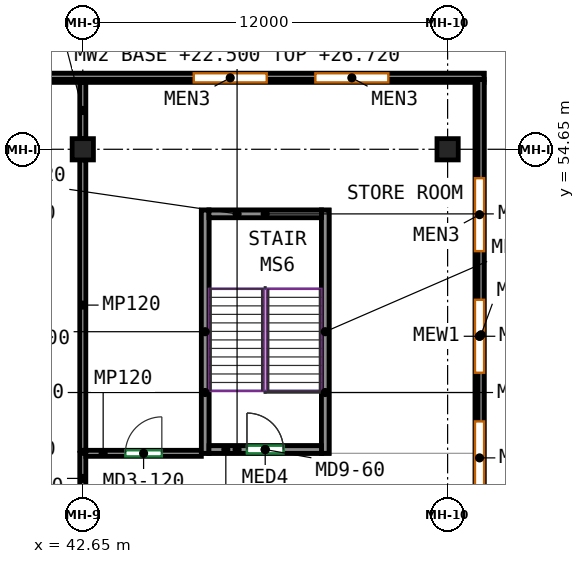
"""IFC4 building model, lengths in metres.
Left out: names, types, materials, properties, quantities, classifications, styles, units other than length and angle.
Written with IfcOpenShell. Run it as: python <this file> out.ifc"""

import sys

from ifc_helpers import new_model, si_unit, direction, frame, frame_2d, origin, origin_2d, place, context, subcontext, project, spatial, rectangle, extrude, source, transform, mapped, element, fill, save


model = new_model("IFC4")
c1 = context("Model", 3, precision=1e-05, world=origin(), true_north=direction((0.0, 1.0)))
c2 = subcontext(c1, "Body", "Model", "MODEL_VIEW")
j1 = project(units=[si_unit("LENGTHUNIT", "METRE"), si_unit("PLANEANGLEUNIT", "RADIAN")], contexts=[c1])
p1 = place(None, origin())
s1 = spatial("IfcSite", under=j1, at=p1, CompositionType="ELEMENT")
p2 = place(p1, origin())
s2 = spatial("IfcBuilding", under=s1, at=p2, CompositionType="ELEMENT")
p3 = place(p2, frame((0.0, 0.0, 22.5)))
s3 = spatial("IfcBuildingStorey", under=s2, at=p3, CompositionType="ELEMENT", Elevation=22.5)
m1 = source(origin(), c2, "Body", "SweptSolid", [
    extrude(rectangle(XDim=0.7, YDim=0.7, at=origin_2d()), origin(), (0.0, 0.0, 1.0), 4.22),
])
for number, where, z_axis, x_axis in (
    (1, (42.65, 54.65, 0.0), (0.0, 0.0, 1.0), (1.0, 0.0, 0.0)),
    (2, (54.65, 54.65, 0.0), (0.0, 0.0, 1.0), (1.0, 0.0, 0.0)),
):
    element("IfcColumn", number, at=place(p3, frame(where, z_axis=z_axis, x_axis=x_axis)), inside=s3, PredefinedType="COLUMN", context=c2, shape_type="MappedRepresentation", body=[
        mapped(m1, transform((0.0, 0.0, 0.0))),
    ])
m2 = source(origin(), c2, "Body", "SweptSolid", [
    extrude(rectangle(XDim=8.0, YDim=0.25, at=frame_2d((4.0, 0.0))), origin(), (0.0, 0.0, 1.0), 4.22),
])
for number, where, z_axis, x_axis in (
    (3, (46.675, 44.65, 0.0), (0.0, 0.0, 1.0), (0.0, 1.0, 0.0)),
    (4, (50.625, 44.65, 0.0), (0.0, 0.0, 1.0), (0.0, 1.0, 0.0)),
):
    element("IfcWall", number, at=place(p3, frame(where, z_axis=z_axis, x_axis=x_axis)), inside=s3, PredefinedType="SHEAR", context=c2, shape_type="MappedRepresentation", body=[
        mapped(m2, transform((0.0, 0.0, 0.0))),
    ])
m3 = source(origin(), c2, "Body", "SweptSolid", [
    extrude(rectangle(XDim=3.7, YDim=0.25, at=frame_2d((1.85, 0.0))), origin(), (0.0, 0.0, 1.0), 4.22),
])
p4 = place(p3, frame((46.8, 44.775, 0.0), z_axis=(0.0, 0.0, 1.0), x_axis=(1.0, 0.0, 0.0)))
e5 = element("IfcWall", 5, at=p4, inside=s3, PredefinedType="SHEAR", context=c2, shape_type="MappedRepresentation", body=[
    mapped(m3, transform((0.0, 0.0, 0.0))),
])
p5 = place(p4, frame((1.25, 0.0, 0.0)))
e6 = element("IfcOpeningElement", 6, at=p5, cuts=e5, PredefinedType="OPENING", context=c2, shape_type="SweptSolid", body=[
    extrude(rectangle(XDim=1.2, YDim=2.1, at=frame_2d((0.6, 1.05))), frame((0.0, 0.135, 0.0), z_axis=(0.0, -1.0, 0.0), x_axis=(1.0, 0.0, 0.0)), (0.0, 0.0, 1.0), 0.27),
])
p6 = place(p3, frame((46.8, 52.525, 0.0), z_axis=(0.0, 0.0, 1.0), x_axis=(1.0, 0.0, 0.0)))
e7 = element("IfcWall", 7, at=p6, inside=s3, PredefinedType="SHEAR", context=c2, shape_type="MappedRepresentation", body=[
    mapped(m3, transform((0.0, 0.0, 0.0))),
])
m4 = source(origin(), c2, "Body", "SweptSolid", [
    extrude(rectangle(XDim=112.7, YDim=0.3, at=frame_2d((56.35, 0.0))), origin(), (0.0, 0.0, 1.0), 4.22),
])
p7 = place(p3, frame((-56.85, 57.0, 0.0), z_axis=(0.0, 0.0, 1.0), x_axis=(1.0, 0.0, 0.0)))
e8 = element("IfcWall", 8, at=p7, inside=s3, PredefinedType="SOLIDWALL", context=c2, shape_type="MappedRepresentation", body=[
    mapped(m4, transform((0.0, 0.0, 0.0))),
])
p8 = place(p7, frame((3.15, 0.0, 0.9)))
e9 = element("IfcOpeningElement", 9, at=p8, cuts=e8, PredefinedType="OPENING", context=c2, shape_type="SweptSolid", body=[
    extrude(rectangle(XDim=2.4, YDim=1.8, at=frame_2d((1.2, 0.9))), frame((0.0, 0.16, 0.0), z_axis=(0.0, -1.0, 0.0), x_axis=(1.0, 0.0, 0.0)), (0.0, 0.0, 1.0), 0.32),
])
p9 = place(p7, frame((7.15, 0.0, 0.9)))
e10 = element("IfcOpeningElement", 10, at=p9, cuts=e8, PredefinedType="OPENING", context=c2, shape_type="SweptSolid", body=[
    extrude(rectangle(XDim=2.4, YDim=1.8, at=frame_2d((1.2, 0.9))), frame((0.0, 0.16, 0.0), z_axis=(0.0, -1.0, 0.0), x_axis=(1.0, 0.0, 0.0)), (0.0, 0.0, 1.0), 0.32),
])
p10 = place(p7, frame((11.15, 0.0, 0.9)))
e11 = element("IfcOpeningElement", 11, at=p10, cuts=e8, PredefinedType="OPENING", context=c2, shape_type="SweptSolid", body=[
    extrude(rectangle(XDim=2.4, YDim=1.8, at=frame_2d((1.2, 0.9))), frame((0.0, 0.16, 0.0), z_axis=(0.0, -1.0, 0.0), x_axis=(1.0, 0.0, 0.0)), (0.0, 0.0, 1.0), 0.32),
])
p11 = place(p7, frame((15.15, 0.0, 0.9)))
e12 = element("IfcOpeningElement", 12, at=p11, cuts=e8, PredefinedType="OPENING", context=c2, shape_type="SweptSolid", body=[
    extrude(rectangle(XDim=2.4, YDim=1.8, at=frame_2d((1.2, 0.9))), frame((0.0, 0.16, 0.0), z_axis=(0.0, -1.0, 0.0), x_axis=(1.0, 0.0, 0.0)), (0.0, 0.0, 1.0), 0.32),
])
p12 = place(p7, frame((19.15, 0.0, 0.9)))
e13 = element("IfcOpeningElement", 13, at=p12, cuts=e8, PredefinedType="OPENING", context=c2, shape_type="SweptSolid", body=[
    extrude(rectangle(XDim=2.4, YDim=1.8, at=frame_2d((1.2, 0.9))), frame((0.0, 0.16, 0.0), z_axis=(0.0, -1.0, 0.0), x_axis=(1.0, 0.0, 0.0)), (0.0, 0.0, 1.0), 0.32),
])
p13 = place(p7, frame((23.15, 0.0, 0.9)))
e14 = element("IfcOpeningElement", 14, at=p13, cuts=e8, PredefinedType="OPENING", context=c2, shape_type="SweptSolid", body=[
    extrude(rectangle(XDim=2.4, YDim=1.8, at=frame_2d((1.2, 0.9))), frame((0.0, 0.16, 0.0), z_axis=(0.0, -1.0, 0.0), x_axis=(1.0, 0.0, 0.0)), (0.0, 0.0, 1.0), 0.32),
])
p14 = place(p7, frame((27.15, 0.0, 0.9)))
e15 = element("IfcOpeningElement", 15, at=p14, cuts=e8, PredefinedType="OPENING", context=c2, shape_type="SweptSolid", body=[
    extrude(rectangle(XDim=2.4, YDim=1.8, at=frame_2d((1.2, 0.9))), frame((0.0, 0.16, 0.0), z_axis=(0.0, -1.0, 0.0), x_axis=(1.0, 0.0, 0.0)), (0.0, 0.0, 1.0), 0.32),
])
p15 = place(p7, frame((31.15, 0.0, 0.9)))
e16 = element("IfcOpeningElement", 16, at=p15, cuts=e8, PredefinedType="OPENING", context=c2, shape_type="SweptSolid", body=[
    extrude(rectangle(XDim=2.4, YDim=1.8, at=frame_2d((1.2, 0.9))), frame((0.0, 0.16, 0.0), z_axis=(0.0, -1.0, 0.0), x_axis=(1.0, 0.0, 0.0)), (0.0, 0.0, 1.0), 0.32),
])
p16 = place(p7, frame((35.15, 0.0, 0.9)))
e17 = element("IfcOpeningElement", 17, at=p16, cuts=e8, PredefinedType="OPENING", context=c2, shape_type="SweptSolid", body=[
    extrude(rectangle(XDim=2.4, YDim=1.8, at=frame_2d((1.2, 0.9))), frame((0.0, 0.16, 0.0), z_axis=(0.0, -1.0, 0.0), x_axis=(1.0, 0.0, 0.0)), (0.0, 0.0, 1.0), 0.32),
])
p17 = place(p7, frame((43.15, 0.0, 0.9)))
e18 = element("IfcOpeningElement", 18, at=p17, cuts=e8, PredefinedType="OPENING", context=c2, shape_type="SweptSolid", body=[
    extrude(rectangle(XDim=2.4, YDim=1.8, at=frame_2d((1.2, 0.9))), frame((0.0, 0.16, 0.0), z_axis=(0.0, -1.0, 0.0), x_axis=(1.0, 0.0, 0.0)), (0.0, 0.0, 1.0), 0.32),
])
p18 = place(p7, frame((47.15, 0.0, 0.9)))
e19 = element("IfcOpeningElement", 19, at=p18, cuts=e8, PredefinedType="OPENING", context=c2, shape_type="SweptSolid", body=[
    extrude(rectangle(XDim=2.4, YDim=1.8, at=frame_2d((1.2, 0.9))), frame((0.0, 0.16, 0.0), z_axis=(0.0, -1.0, 0.0), x_axis=(1.0, 0.0, 0.0)), (0.0, 0.0, 1.0), 0.32),
])
p19 = place(p7, frame((51.15, 0.0, 0.9)))
e20 = element("IfcOpeningElement", 20, at=p19, cuts=e8, PredefinedType="OPENING", context=c2, shape_type="SweptSolid", body=[
    extrude(rectangle(XDim=2.4, YDim=1.8, at=frame_2d((1.2, 0.9))), frame((0.0, 0.16, 0.0), z_axis=(0.0, -1.0, 0.0), x_axis=(1.0, 0.0, 0.0)), (0.0, 0.0, 1.0), 0.32),
])
p20 = place(p7, frame((55.15, 0.0, 0.9)))
e21 = element("IfcOpeningElement", 21, at=p20, cuts=e8, PredefinedType="OPENING", context=c2, shape_type="SweptSolid", body=[
    extrude(rectangle(XDim=2.4, YDim=1.8, at=frame_2d((1.2, 0.9))), frame((0.0, 0.16, 0.0), z_axis=(0.0, -1.0, 0.0), x_axis=(1.0, 0.0, 0.0)), (0.0, 0.0, 1.0), 0.32),
])
p21 = place(p7, frame((59.15, 0.0, 0.9)))
e22 = element("IfcOpeningElement", 22, at=p21, cuts=e8, PredefinedType="OPENING", context=c2, shape_type="SweptSolid", body=[
    extrude(rectangle(XDim=2.4, YDim=1.8, at=frame_2d((1.2, 0.9))), frame((0.0, 0.16, 0.0), z_axis=(0.0, -1.0, 0.0), x_axis=(1.0, 0.0, 0.0)), (0.0, 0.0, 1.0), 0.32),
])
p22 = place(p7, frame((63.15, 0.0, 0.9)))
e23 = element("IfcOpeningElement", 23, at=p22, cuts=e8, PredefinedType="OPENING", context=c2, shape_type="SweptSolid", body=[
    extrude(rectangle(XDim=2.4, YDim=1.8, at=frame_2d((1.2, 0.9))), frame((0.0, 0.16, 0.0), z_axis=(0.0, -1.0, 0.0), x_axis=(1.0, 0.0, 0.0)), (0.0, 0.0, 1.0), 0.32),
])
p23 = place(p7, frame((67.15, 0.0, 0.9)))
e24 = element("IfcOpeningElement", 24, at=p23, cuts=e8, PredefinedType="OPENING", context=c2, shape_type="SweptSolid", body=[
    extrude(rectangle(XDim=2.4, YDim=1.8, at=frame_2d((1.2, 0.9))), frame((0.0, 0.16, 0.0), z_axis=(0.0, -1.0, 0.0), x_axis=(1.0, 0.0, 0.0)), (0.0, 0.0, 1.0), 0.32),
])
p24 = place(p7, frame((71.15, 0.0, 0.9)))
e25 = element("IfcOpeningElement", 25, at=p24, cuts=e8, PredefinedType="OPENING", context=c2, shape_type="SweptSolid", body=[
    extrude(rectangle(XDim=2.4, YDim=1.8, at=frame_2d((1.2, 0.9))), frame((0.0, 0.16, 0.0), z_axis=(0.0, -1.0, 0.0), x_axis=(1.0, 0.0, 0.0)), (0.0, 0.0, 1.0), 0.32),
])
p25 = place(p7, frame((75.15, 0.0, 0.9)))
e26 = element("IfcOpeningElement", 26, at=p25, cuts=e8, PredefinedType="OPENING", context=c2, shape_type="SweptSolid", body=[
    extrude(rectangle(XDim=2.4, YDim=1.8, at=frame_2d((1.2, 0.9))), frame((0.0, 0.16, 0.0), z_axis=(0.0, -1.0, 0.0), x_axis=(1.0, 0.0, 0.0)), (0.0, 0.0, 1.0), 0.32),
])
p26 = place(p7, frame((79.15, 0.0, 0.9)))
e27 = element("IfcOpeningElement", 27, at=p26, cuts=e8, PredefinedType="OPENING", context=c2, shape_type="SweptSolid", body=[
    extrude(rectangle(XDim=2.4, YDim=1.8, at=frame_2d((1.2, 0.9))), frame((0.0, 0.16, 0.0), z_axis=(0.0, -1.0, 0.0), x_axis=(1.0, 0.0, 0.0)), (0.0, 0.0, 1.0), 0.32),
])
p27 = place(p7, frame((83.15, 0.0, 0.9)))
e28 = element("IfcOpeningElement", 28, at=p27, cuts=e8, PredefinedType="OPENING", context=c2, shape_type="SweptSolid", body=[
    extrude(rectangle(XDim=2.4, YDim=1.8, at=frame_2d((1.2, 0.9))), frame((0.0, 0.16, 0.0), z_axis=(0.0, -1.0, 0.0), x_axis=(1.0, 0.0, 0.0)), (0.0, 0.0, 1.0), 0.32),
])
p28 = place(p7, frame((87.15, 0.0, 0.9)))
e29 = element("IfcOpeningElement", 29, at=p28, cuts=e8, PredefinedType="OPENING", context=c2, shape_type="SweptSolid", body=[
    extrude(rectangle(XDim=2.4, YDim=1.8, at=frame_2d((1.2, 0.9))), frame((0.0, 0.16, 0.0), z_axis=(0.0, -1.0, 0.0), x_axis=(1.0, 0.0, 0.0)), (0.0, 0.0, 1.0), 0.32),
])
p29 = place(p7, frame((91.15, 0.0, 0.9)))
e30 = element("IfcOpeningElement", 30, at=p29, cuts=e8, PredefinedType="OPENING", context=c2, shape_type="SweptSolid", body=[
    extrude(rectangle(XDim=2.4, YDim=1.8, at=frame_2d((1.2, 0.9))), frame((0.0, 0.16, 0.0), z_axis=(0.0, -1.0, 0.0), x_axis=(1.0, 0.0, 0.0)), (0.0, 0.0, 1.0), 0.32),
])
p30 = place(p7, frame((95.15, 0.0, 0.9)))
e31 = element("IfcOpeningElement", 31, at=p30, cuts=e8, PredefinedType="OPENING", context=c2, shape_type="SweptSolid", body=[
    extrude(rectangle(XDim=2.4, YDim=1.8, at=frame_2d((1.2, 0.9))), frame((0.0, 0.16, 0.0), z_axis=(0.0, -1.0, 0.0), x_axis=(1.0, 0.0, 0.0)), (0.0, 0.0, 1.0), 0.32),
])
p31 = place(p7, frame((103.15, 0.0, 0.9)))
e32 = element("IfcOpeningElement", 32, at=p31, cuts=e8, PredefinedType="OPENING", context=c2, shape_type="SweptSolid", body=[
    extrude(rectangle(XDim=2.4, YDim=1.8, at=frame_2d((1.2, 0.9))), frame((0.0, 0.16, 0.0), z_axis=(0.0, -1.0, 0.0), x_axis=(1.0, 0.0, 0.0)), (0.0, 0.0, 1.0), 0.32),
])
p32 = place(p7, frame((107.15, 0.0, 0.9)))
e33 = element("IfcOpeningElement", 33, at=p32, cuts=e8, PredefinedType="OPENING", context=c2, shape_type="SweptSolid", body=[
    extrude(rectangle(XDim=2.4, YDim=1.8, at=frame_2d((1.2, 0.9))), frame((0.0, 0.16, 0.0), z_axis=(0.0, -1.0, 0.0), x_axis=(1.0, 0.0, 0.0)), (0.0, 0.0, 1.0), 0.32),
])
m5 = source(origin(), c2, "Body", "SweptSolid", [
    extrude(rectangle(XDim=16.7, YDim=0.3, at=frame_2d((8.35, 0.0))), origin(), (0.0, 0.0, 1.0), 4.22),
])
p33 = place(p3, frame((55.7, 56.85, 0.0), z_axis=(0.0, 0.0, 1.0), x_axis=(0.0, -1.0, 0.0)))
e34 = element("IfcWall", 34, at=p33, inside=s3, PredefinedType="SOLIDWALL", context=c2, shape_type="MappedRepresentation", body=[
    mapped(m5, transform((0.0, 0.0, 0.0))),
])
p34 = place(p33, frame((3.15, 0.0, 0.9)))
e35 = element("IfcOpeningElement", 35, at=p34, cuts=e34, PredefinedType="OPENING", context=c2, shape_type="SweptSolid", body=[
    extrude(rectangle(XDim=2.4, YDim=1.8, at=frame_2d((1.2, 0.9))), frame((0.0, 0.16, 0.0), z_axis=(0.0, -1.0, 0.0), x_axis=(1.0, 0.0, 0.0)), (0.0, 0.0, 1.0), 0.32),
])
p35 = place(p33, frame((7.15, 0.0, 0.9)))
e36 = element("IfcOpeningElement", 36, at=p35, cuts=e34, PredefinedType="OPENING", context=c2, shape_type="SweptSolid", body=[
    extrude(rectangle(XDim=2.4, YDim=1.8, at=frame_2d((1.2, 0.9))), frame((0.0, 0.16, 0.0), z_axis=(0.0, -1.0, 0.0), x_axis=(1.0, 0.0, 0.0)), (0.0, 0.0, 1.0), 0.32),
])
p36 = place(p33, frame((11.15, 0.0, 0.9)))
e37 = element("IfcOpeningElement", 37, at=p36, cuts=e34, PredefinedType="OPENING", context=c2, shape_type="SweptSolid", body=[
    extrude(rectangle(XDim=2.4, YDim=1.8, at=frame_2d((1.2, 0.9))), frame((0.0, 0.16, 0.0), z_axis=(0.0, -1.0, 0.0), x_axis=(1.0, 0.0, 0.0)), (0.0, 0.0, 1.0), 0.32),
])
m6 = source(origin(), c2, "Body", "SweptSolid", [
    extrude(rectangle(XDim=112.8, YDim=0.2, at=frame_2d((56.4, 0.0))), origin(), (0.0, 0.0, 1.0), 1.1),
])
p37 = place(p3, frame((-56.95, 57.05, 4.5), z_axis=(0.0, 0.0, 1.0), x_axis=(1.0, 0.0, 0.0)))
e38 = element("IfcWall", 38, at=p37, inside=s3, PredefinedType="PARAPET", context=c2, shape_type="MappedRepresentation", body=[
    mapped(m6, transform((0.0, 0.0, 0.0))),
])
m7 = source(origin(), c2, "Body", "SweptSolid", [
    extrude(rectangle(XDim=16.8, YDim=0.2, at=frame_2d((8.4, 0.0))), origin(), (0.0, 0.0, 1.0), 1.1),
])
p38 = place(p3, frame((55.75, 56.95, 4.5), z_axis=(0.0, 0.0, 1.0), x_axis=(0.0, -1.0, 0.0)))
e39 = element("IfcWall", 39, at=p38, inside=s3, PredefinedType="PARAPET", context=c2, shape_type="MappedRepresentation", body=[
    mapped(m7, transform((0.0, 0.0, 0.0))),
])
m8 = source(origin(), c2, "Body", "SweptSolid", [
    extrude(rectangle(XDim=8.0, YDim=0.25, at=frame_2d((4.0, 0.0))), origin(), (0.0, 0.0, 1.0), 3.0),
])
for number, where, z_axis, x_axis in (
    (40, (46.675, 44.65, 4.5), (0.0, 0.0, 1.0), (0.0, 1.0, 0.0)),
    (41, (50.625, 44.65, 4.5), (0.0, 0.0, 1.0), (0.0, 1.0, 0.0)),
):
    element("IfcWall", number, at=place(p3, frame(where, z_axis=z_axis, x_axis=x_axis)), inside=s3, PredefinedType="SOLIDWALL", context=c2, shape_type="MappedRepresentation", body=[
        mapped(m8, transform((0.0, 0.0, 0.0))),
    ])
m9 = source(origin(), c2, "Body", "SweptSolid", [
    extrude(rectangle(XDim=3.7, YDim=0.25, at=frame_2d((1.85, 0.0))), origin(), (0.0, 0.0, 1.0), 3.0),
])
p39 = place(p3, frame((46.8, 44.775, 4.5), z_axis=(0.0, 0.0, 1.0), x_axis=(1.0, 0.0, 0.0)))
e42 = element("IfcWall", 42, at=p39, inside=s3, PredefinedType="SOLIDWALL", context=c2, shape_type="MappedRepresentation", body=[
    mapped(m9, transform((0.0, 0.0, 0.0))),
])
p40 = place(p39, frame((1.25, 0.0, 0.0)))
e43 = element("IfcOpeningElement", 43, at=p40, cuts=e42, PredefinedType="OPENING", context=c2, shape_type="SweptSolid", body=[
    extrude(rectangle(XDim=1.2, YDim=2.1, at=frame_2d((0.6, 1.05))), frame((0.0, 0.135, 0.0), z_axis=(0.0, -1.0, 0.0), x_axis=(1.0, 0.0, 0.0)), (0.0, 0.0, 1.0), 0.27),
])
p41 = place(p3, frame((46.8, 52.525, 4.5), z_axis=(0.0, 0.0, 1.0), x_axis=(1.0, 0.0, 0.0)))
e44 = element("IfcWall", 44, at=p41, inside=s3, PredefinedType="SOLIDWALL", context=c2, shape_type="MappedRepresentation", body=[
    mapped(m9, transform((0.0, 0.0, 0.0))),
])
m10 = source(origin(), c2, "Body", "SweptSolid", [
    extrude(rectangle(XDim=1.65, YDim=0.2, at=frame_2d((0.825, 0.0))), origin(), (0.0, 0.0, 1.0), 3.42),
])
p42 = place(p3, frame((42.65, 43.0, 0.0), z_axis=(0.0, 0.0, 1.0), x_axis=(0.0, 1.0, 0.0)))
e45 = element("IfcWall", 45, at=p42, inside=s3, PredefinedType="PARTITIONING", context=c2, shape_type="MappedRepresentation", body=[
    mapped(m10, transform((0.0, 0.0, 0.0))),
])
m11 = source(origin(), c2, "Body", "SweptSolid", [
    extrude(rectangle(XDim=3.8, YDim=0.2, at=frame_2d((1.9, 0.0))), origin(), (0.0, 0.0, 1.0), 3.42),
])
p43 = place(p3, frame((42.75, 44.65, 0.0), z_axis=(0.0, 0.0, 1.0), x_axis=(1.0, 0.0, 0.0)))
e46 = element("IfcWall", 46, at=p43, inside=s3, PredefinedType="PARTITIONING", context=c2, shape_type="MappedRepresentation", body=[
    mapped(m11, transform((0.0, 0.0, 0.0))),
])
p44 = place(p43, frame((1.3, 0.0, 0.0)))
e47 = element("IfcOpeningElement", 47, at=p44, cuts=e46, PredefinedType="OPENING", context=c2, shape_type="SweptSolid", body=[
    extrude(rectangle(XDim=1.2, YDim=2.1, at=frame_2d((0.6, 1.05))), frame((0.0, 0.11, 0.0), z_axis=(0.0, -1.0, 0.0), x_axis=(1.0, 0.0, 0.0)), (0.0, 0.0, 1.0), 0.22),
])
m12 = source(origin(), c2, "Body", "SweptSolid", [
    extrude(rectangle(XDim=9.55, YDim=0.2, at=frame_2d((4.775, 0.0))), origin(), (0.0, 0.0, 1.0), 3.42),
])
p45 = place(p3, frame((42.65, 54.3, 0.0), z_axis=(0.0, 0.0, 1.0), x_axis=(0.0, -1.0, 0.0)))
e48 = element("IfcWall", 48, at=p45, inside=s3, PredefinedType="PARTITIONING", context=c2, shape_type="MappedRepresentation", body=[
    mapped(m12, transform((0.0, 0.0, 0.0))),
])
m13 = source(origin(), c2, "Body", "SweptSolid", [
    extrude(rectangle(XDim=1.85, YDim=0.2, at=frame_2d((0.925, 0.0))), origin(), (0.0, 0.0, 1.0), 4.22),
])
p46 = place(p3, frame((42.65, 56.85, 0.0), z_axis=(0.0, 0.0, 1.0), x_axis=(0.0, -1.0, 0.0)))
e49 = element("IfcWall", 49, at=p46, inside=s3, PredefinedType="PARTITIONING", context=c2, shape_type="MappedRepresentation", body=[
    mapped(m13, transform((0.0, 0.0, 0.0))),
])
p47 = place(p31, origin())
e50 = element("IfcWindow", 50, at=p47, inside=s3, PartitioningType="SINGLE_PANEL", PredefinedType="WINDOW", context=c2, shape_type="SweptSolid", body=[
    extrude(rectangle(XDim=2.4, YDim=1.8, at=frame_2d((1.2, 0.9))), frame((0.0, 0.03, 0.0), z_axis=(0.0, -1.0, 0.0), x_axis=(1.0, 0.0, 0.0)), (0.0, 0.0, 1.0), 0.06),
])
fill(e32, e50)
p48 = place(p32, origin())
e51 = element("IfcWindow", 51, at=p48, inside=s3, PartitioningType="SINGLE_PANEL", PredefinedType="WINDOW", context=c2, shape_type="SweptSolid", body=[
    extrude(rectangle(XDim=2.4, YDim=1.8, at=frame_2d((1.2, 0.9))), frame((0.0, 0.03, 0.0), z_axis=(0.0, -1.0, 0.0), x_axis=(1.0, 0.0, 0.0)), (0.0, 0.0, 1.0), 0.06),
])
fill(e33, e51)
p49 = place(p34, origin())
e52 = element("IfcWindow", 52, at=p49, inside=s3, PartitioningType="SINGLE_PANEL", PredefinedType="WINDOW", context=c2, shape_type="SweptSolid", body=[
    extrude(rectangle(XDim=2.4, YDim=1.8, at=frame_2d((1.2, 0.9))), frame((0.0, 0.03, 0.0), z_axis=(0.0, -1.0, 0.0), x_axis=(1.0, 0.0, 0.0)), (0.0, 0.0, 1.0), 0.06),
])
fill(e35, e52)
p50 = place(p35, origin())
e53 = element("IfcWindow", 53, at=p50, inside=s3, PartitioningType="SINGLE_PANEL", PredefinedType="WINDOW", context=c2, shape_type="SweptSolid", body=[
    extrude(rectangle(XDim=2.4, YDim=1.8, at=frame_2d((1.2, 0.9))), frame((0.0, 0.03, 0.0), z_axis=(0.0, -1.0, 0.0), x_axis=(1.0, 0.0, 0.0)), (0.0, 0.0, 1.0), 0.06),
])
fill(e36, e53)
p51 = place(p36, origin())
e54 = element("IfcWindow", 54, at=p51, inside=s3, PartitioningType="SINGLE_PANEL", PredefinedType="WINDOW", context=c2, shape_type="SweptSolid", body=[
    extrude(rectangle(XDim=2.4, YDim=1.8, at=frame_2d((1.2, 0.9))), frame((0.0, 0.03, 0.0), z_axis=(0.0, -1.0, 0.0), x_axis=(1.0, 0.0, 0.0)), (0.0, 0.0, 1.0), 0.06),
])
fill(e37, e54)
p52 = place(p40, origin())
e55 = element("IfcDoor", 55, at=p52, inside=s3, OperationType="DOUBLE_DOOR_SINGLE_SWING", PredefinedType="DOOR", context=c2, shape_type="SweptSolid", body=[
    extrude(rectangle(XDim=1.2, YDim=2.1, at=frame_2d((0.6, 1.05))), frame((0.0, 0.025, 0.0), z_axis=(0.0, -1.0, 0.0), x_axis=(1.0, 0.0, 0.0)), (0.0, 0.0, 1.0), 0.05),
])
fill(e43, e55)
p53 = place(p5, origin())
e56 = element("IfcDoor", 56, at=p53, inside=s3, OperationType="DOUBLE_DOOR_SINGLE_SWING", PredefinedType="DOOR", context=c2, shape_type="SweptSolid", body=[
    extrude(rectangle(XDim=1.2, YDim=2.1, at=frame_2d((0.6, 1.05))), frame((0.0, 0.025, 0.0), z_axis=(0.0, -1.0, 0.0), x_axis=(1.0, 0.0, 0.0)), (0.0, 0.0, 1.0), 0.05),
])
fill(e6, e56)
p54 = place(p44, origin())
e57 = element("IfcDoor", 57, at=p54, inside=s3, OperationType="SINGLE_SWING_RIGHT", PredefinedType="DOOR", context=c2, shape_type="SweptSolid", body=[
    extrude(rectangle(XDim=1.2, YDim=2.1, at=frame_2d((0.6, 1.05))), frame((0.0, 0.025, 0.0), z_axis=(0.0, -1.0, 0.0), x_axis=(1.0, 0.0, 0.0)), (0.0, 0.0, 1.0), 0.05),
])
fill(e47, e57)
save(model, sys.argv[1])
